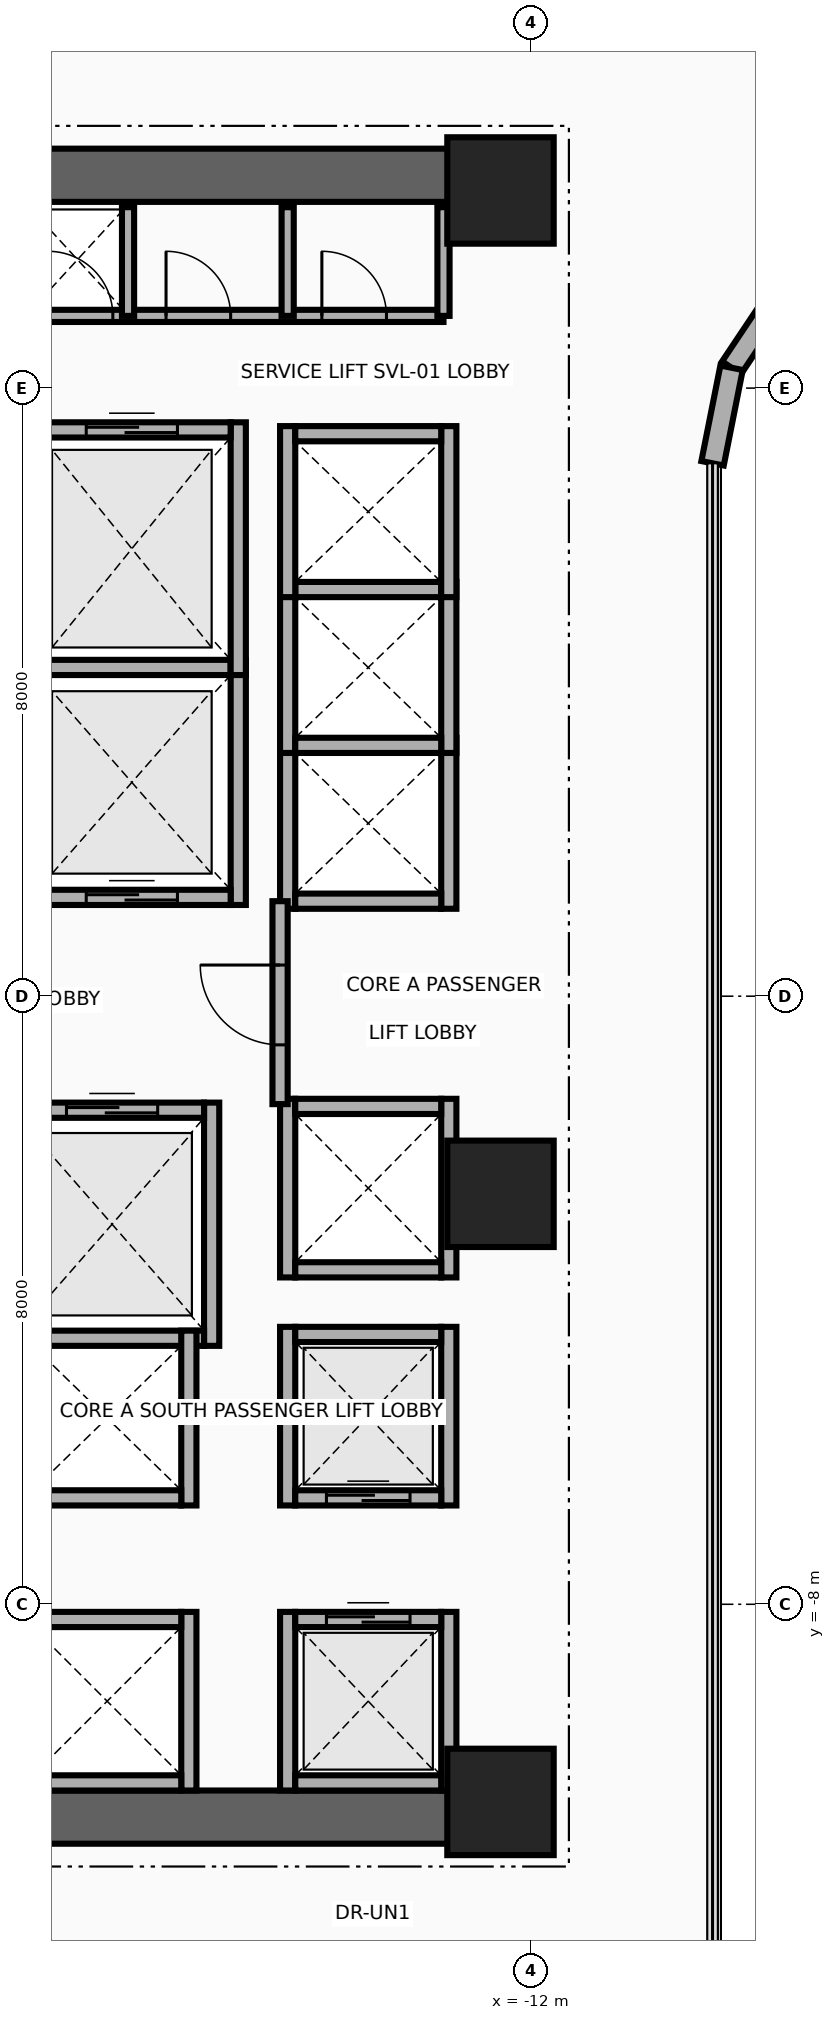
"""IFC4 building model, lengths in metres.
Left out: names, types, materials, properties, quantities, classifications, styles, units other than length and angle.
Written with IfcOpenShell. Run it as: python <this file> out.ifc"""

import sys

from ifc_helpers import new_model, si_unit, direction, frame, frame_2d, origin, origin_2d, place, context, subcontext, project, spatial, rectangle, extrude, source, transform, mapped, element, fill, save


model = new_model("IFC4")
c1 = context("Model", 3, precision=1e-05, world=origin(), true_north=direction((0.0, 1.0)))
c2 = subcontext(c1, "Body", "Model", "MODEL_VIEW")
j1 = project(units=[si_unit("LENGTHUNIT", "METRE"), si_unit("PLANEANGLEUNIT", "RADIAN")], contexts=[c1])
p1 = place(None, origin())
s1 = spatial("IfcSite", under=j1, at=p1, CompositionType="ELEMENT")
p2 = place(p1, origin())
s2 = spatial("IfcBuilding", under=s1, at=p2, CompositionType="ELEMENT")
p3 = place(p2, frame((0.0, 0.0, 40.8)))
s3 = spatial("IfcBuildingStorey", under=s2, at=p3, CompositionType="ELEMENT", Elevation=40.8)
for number, where, z_axis, x_axis in (
    (1, (-22.65, 10.8, 0.0), (0.0, 0.0, 1.0), (1.0, 0.0, 0.0)),
    (2, (-22.65, -10.8, 0.0), (0.0, 0.0, 1.0), (1.0, 0.0, 0.0)),
):
    element("IfcWall", number, at=place(p3, frame(where, z_axis=z_axis, x_axis=x_axis)), inside=s3, PredefinedType="SHEAR", context=c2, shape_type="SweptSolid", body=[
        extrude(rectangle(XDim=10.25, YDim=0.7, at=frame_2d((5.125, 0.0))), origin(), (0.0, 0.0, 1.0), 3.46),
    ])
m1 = source(origin(), c2, "Body", "SweptSolid", [
    extrude(rectangle(XDim=1.4, YDim=1.4, at=origin_2d()), origin(), (0.0, 0.0, 1.0), 3.7),
])
for number, where, z_axis, x_axis in (
    (3, (-12.4, -10.6, 0.0), (0.0, 0.0, 1.0), (1.0, 0.0, 0.0)),
    (4, (-12.4, -2.6, 0.0), (0.0, 0.0, 1.0), (1.0, 0.0, 0.0)),
    (5, (-12.4, 10.6, 0.0), (0.0, 0.0, 1.0), (1.0, 0.0, 0.0)),
):
    element("IfcColumn", number, at=place(p3, frame(where, z_axis=z_axis, x_axis=x_axis)), inside=s3, PredefinedType="COLUMN", context=c2, shape_type="MappedRepresentation", body=[
        mapped(m1, transform((0.0, 0.0, 0.0), x_axis=(1.0, 0.0, 0.0), y_axis=(0.0, 1.0, 0.0), z_axis=(0.0, 0.0, 1.0), scale=1.0)),
    ])
p4 = place(p3, frame((-8.642, 9.342, 0.0), z_axis=(0.0, 0.0, 1.0), x_axis=(-0.555615398575, -0.831439431869, 0.0)))
e6 = element("IfcWall", 6, at=p4, inside=s3, PredefinedType="SOLIDWALL", context=c2, shape_type="SweptSolid", body=[
    extrude(rectangle(XDim=1.292, YDim=0.3, at=frame_2d((0.646, 0.0))), origin(), (0.0, 0.0, 1.0), 3.46),
])
p5 = place(p3, frame((-9.36, 8.268, 0.0), z_axis=(0.0, 0.0, 1.0), x_axis=(-0.195090163074, -0.980785312019, 0.0)))
e7 = element("IfcWall", 7, at=p5, inside=s3, PredefinedType="SOLIDWALL", context=c2, shape_type="SweptSolid", body=[
    extrude(rectangle(XDim=1.281, YDim=0.3, at=frame_2d((0.641, 0.0))), origin(), (0.0, 0.0, 1.0), 3.46),
])
p6 = place(p3, frame((-15.85, 1.2, 0.0), z_axis=(0.0, 0.0, 1.0), x_axis=(0.0, 1.0, 0.0)))
e8 = element("IfcWall", 8, at=p6, inside=s3, PredefinedType="MOVABLE", context=c2, shape_type="SweptSolid", body=[
    extrude(rectangle(XDim=3.225, YDim=0.2, at=frame_2d((1.613, 0.0))), origin(), (0.0, 0.0, 1.0), 3.46),
])
p7 = place(p3, frame((-18.55, 1.3, 0.0), z_axis=(0.0, 0.0, 1.0), x_axis=(1.0, 0.0, 0.0)))
e9 = element("IfcWall", 9, at=p7, inside=s3, PredefinedType="MOVABLE", context=c2, shape_type="SweptSolid", body=[
    extrude(rectangle(XDim=2.6, YDim=0.2, at=frame_2d((1.3, 0.0))), origin(), (0.0, 0.0, 1.0), 3.46),
])
p8 = place(p7, frame((0.7, 0.0, 0.0)))
e10 = element("IfcOpeningElement", 10, at=p8, cuts=e9, PredefinedType="OPENING", context=c2, shape_type="SweptSolid", body=[
    extrude(rectangle(XDim=1.2, YDim=2.1, at=frame_2d((0.6, 1.05))), frame((0.0, 0.115, 0.0), z_axis=(0.0, -1.0, 0.0), x_axis=(1.0, 0.0, 0.0)), (0.0, 0.0, 1.0), 0.23),
])
p9 = place(p3, frame((-18.55, 4.325, 0.0), z_axis=(0.0, 0.0, 1.0), x_axis=(1.0, 0.0, 0.0)))
e11 = element("IfcWall", 11, at=p9, inside=s3, PredefinedType="MOVABLE", context=c2, shape_type="SweptSolid", body=[
    extrude(rectangle(XDim=2.6, YDim=0.2, at=frame_2d((1.3, 0.0))), origin(), (0.0, 0.0, 1.0), 3.46),
])
p10 = place(p3, frame((-16.2, -4.6, 0.0), z_axis=(0.0, 0.0, 1.0), x_axis=(0.0, 1.0, 0.0)))
e12 = element("IfcWall", 12, at=p10, inside=s3, PredefinedType="MOVABLE", context=c2, shape_type="SweptSolid", body=[
    extrude(rectangle(XDim=3.2, YDim=0.2, at=frame_2d((1.6, 0.0))), origin(), (0.0, 0.0, 1.0), 3.46),
])
p11 = place(p3, frame((-18.72, -4.5, 0.0), z_axis=(0.0, 0.0, 1.0), x_axis=(1.0, 0.0, 0.0)))
e13 = element("IfcWall", 13, at=p11, inside=s3, PredefinedType="MOVABLE", context=c2, shape_type="SweptSolid", body=[
    extrude(rectangle(XDim=2.42, YDim=0.2, at=frame_2d((1.21, 0.0))), origin(), (0.0, 0.0, 1.0), 3.46),
])
p12 = place(p3, frame((-18.72, -1.5, 0.0), z_axis=(0.0, 0.0, 1.0), x_axis=(1.0, 0.0, 0.0)))
e14 = element("IfcWall", 14, at=p12, inside=s3, PredefinedType="MOVABLE", context=c2, shape_type="SweptSolid", body=[
    extrude(rectangle(XDim=2.42, YDim=0.2, at=frame_2d((1.21, 0.0))), origin(), (0.0, 0.0, 1.0), 3.46),
])
p13 = place(p12, frame((0.61, 0.0, 0.0)))
e15 = element("IfcOpeningElement", 15, at=p13, cuts=e14, PredefinedType="OPENING", context=c2, shape_type="SweptSolid", body=[
    extrude(rectangle(XDim=1.2, YDim=2.1, at=frame_2d((0.6, 1.05))), frame((0.0, 0.115, 0.0), z_axis=(0.0, -1.0, 0.0), x_axis=(1.0, 0.0, 0.0)), (0.0, 0.0, 1.0), 0.23),
])
p14 = place(p3, frame((-15.85, 4.225, 0.0), z_axis=(0.0, 0.0, 1.0), x_axis=(0.0, 1.0, 0.0)))
e16 = element("IfcWall", 16, at=p14, inside=s3, PredefinedType="MOVABLE", context=c2, shape_type="SweptSolid", body=[
    extrude(rectangle(XDim=3.325, YDim=0.2, at=frame_2d((1.663, 0.0))), origin(), (0.0, 0.0, 1.0), 3.46),
])
p15 = place(p3, frame((-18.55, 7.45, 0.0), z_axis=(0.0, 0.0, 1.0), x_axis=(1.0, 0.0, 0.0)))
e17 = element("IfcWall", 17, at=p15, inside=s3, PredefinedType="MOVABLE", context=c2, shape_type="SweptSolid", body=[
    extrude(rectangle(XDim=2.6, YDim=0.2, at=frame_2d((1.3, 0.0))), origin(), (0.0, 0.0, 1.0), 3.46),
])
p16 = place(p15, frame((0.7, 0.0, 0.0)))
e18 = element("IfcOpeningElement", 18, at=p16, cuts=e17, PredefinedType="OPENING", context=c2, shape_type="SweptSolid", body=[
    extrude(rectangle(XDim=1.2, YDim=2.1, at=frame_2d((0.6, 1.05))), frame((0.0, 0.115, 0.0), z_axis=(0.0, -1.0, 0.0), x_axis=(1.0, 0.0, 0.0)), (0.0, 0.0, 1.0), 0.23),
])
for number, where, z_axis, x_axis in (
    (19, (-15.2, -10.45, 0.0), (0.0, 0.0, 1.0), (0.0, 1.0, 0.0)),
    (20, (-13.08, -10.45, 0.0), (0.0, 0.0, 1.0), (0.0, 1.0, 0.0)),
):
    element("IfcWall", number, at=place(p3, frame(where, z_axis=z_axis, x_axis=x_axis)), inside=s3, PredefinedType="MOVABLE", context=c2, shape_type="SweptSolid", body=[
        extrude(rectangle(XDim=2.35, YDim=0.2, at=frame_2d((1.175, 0.0))), origin(), (0.0, 0.0, 1.0), 2.583),
    ])
p17 = place(p3, frame((-15.1, -10.35, 0.0), z_axis=(0.0, 0.0, 1.0), x_axis=(1.0, 0.0, 0.0)))
e21 = element("IfcWall", 21, at=p17, inside=s3, PredefinedType="MOVABLE", context=c2, shape_type="SweptSolid", body=[
    extrude(rectangle(XDim=1.92, YDim=0.2, at=frame_2d((0.96, 0.0))), origin(), (0.0, 0.0, 1.0), 2.583),
])
p18 = place(p3, frame((-15.1, -8.2, 0.0), z_axis=(0.0, 0.0, 1.0), x_axis=(1.0, 0.0, 0.0)))
e22 = element("IfcWall", 22, at=p18, inside=s3, PredefinedType="MOVABLE", context=c2, shape_type="SweptSolid", body=[
    extrude(rectangle(XDim=1.92, YDim=0.2, at=frame_2d((0.96, 0.0))), origin(), (0.0, 0.0, 1.0), 3.46),
])
p19 = place(p18, frame((0.41, 0.0, 0.0)))
e23 = element("IfcOpeningElement", 23, at=p19, cuts=e22, PredefinedType="OPENING", context=c2, shape_type="SweptSolid", body=[
    extrude(rectangle(XDim=1.1, YDim=2.1, at=frame_2d((0.55, 1.05))), frame((0.0, 0.115, 0.0), z_axis=(0.0, -1.0, 0.0), x_axis=(1.0, 0.0, 0.0)), (0.0, 0.0, 1.0), 0.23),
])
for number, where, z_axis, x_axis in (
    (24, (-15.2, -6.7, 0.0), (0.0, 0.0, 1.0), (0.0, 1.0, 0.0)),
    (25, (-13.08, -6.7, 0.0), (0.0, 0.0, 1.0), (0.0, 1.0, 0.0)),
):
    element("IfcWall", number, at=place(p3, frame(where, z_axis=z_axis, x_axis=x_axis)), inside=s3, PredefinedType="MOVABLE", context=c2, shape_type="SweptSolid", body=[
        extrude(rectangle(XDim=2.35, YDim=0.2, at=frame_2d((1.175, 0.0))), origin(), (0.0, 0.0, 1.0), 3.46),
    ])
p20 = place(p3, frame((-15.1, -6.6, 0.0), z_axis=(0.0, 0.0, 1.0), x_axis=(1.0, 0.0, 0.0)))
e26 = element("IfcWall", 26, at=p20, inside=s3, PredefinedType="MOVABLE", context=c2, shape_type="SweptSolid", body=[
    extrude(rectangle(XDim=1.92, YDim=0.2, at=frame_2d((0.96, 0.0))), origin(), (0.0, 0.0, 1.0), 3.46),
])
p21 = place(p20, frame((0.41, 0.0, 0.0)))
e27 = element("IfcOpeningElement", 27, at=p21, cuts=e26, PredefinedType="OPENING", context=c2, shape_type="SweptSolid", body=[
    extrude(rectangle(XDim=1.1, YDim=2.1, at=frame_2d((0.55, 1.05))), frame((0.0, 0.115, 0.0), z_axis=(0.0, -1.0, 0.0), x_axis=(1.0, 0.0, 0.0)), (0.0, 0.0, 1.0), 0.23),
])
p22 = place(p3, frame((-15.1, -4.45, 0.0), z_axis=(0.0, 0.0, 1.0), x_axis=(1.0, 0.0, 0.0)))
e28 = element("IfcWall", 28, at=p22, inside=s3, PredefinedType="MOVABLE", context=c2, shape_type="SweptSolid", body=[
    extrude(rectangle(XDim=1.92, YDim=0.2, at=frame_2d((0.96, 0.0))), origin(), (0.0, 0.0, 1.0), 3.46),
])
p23 = place(p3, frame((-16.5, -10.45, 0.0), z_axis=(0.0, 0.0, 1.0), x_axis=(0.0, 1.0, 0.0)))
e29 = element("IfcWall", 29, at=p23, inside=s3, PredefinedType="MOVABLE", context=c2, shape_type="SweptSolid", body=[
    extrude(rectangle(XDim=2.35, YDim=0.2, at=frame_2d((1.175, 0.0))), origin(), (0.0, 0.0, 1.0), 2.583),
])
p24 = place(p3, frame((-18.55, -10.35, 0.0), z_axis=(0.0, 0.0, 1.0), x_axis=(1.0, 0.0, 0.0)))
e30 = element("IfcWall", 30, at=p24, inside=s3, PredefinedType="MOVABLE", context=c2, shape_type="SweptSolid", body=[
    extrude(rectangle(XDim=1.95, YDim=0.2, at=frame_2d((0.975, 0.0))), origin(), (0.0, 0.0, 1.0), 2.583),
])
p25 = place(p3, frame((-18.55, -8.2, 0.0), z_axis=(0.0, 0.0, 1.0), x_axis=(1.0, 0.0, 0.0)))
e31 = element("IfcWall", 31, at=p25, inside=s3, PredefinedType="MOVABLE", context=c2, shape_type="SweptSolid", body=[
    extrude(rectangle(XDim=1.95, YDim=0.2, at=frame_2d((0.975, 0.0))), origin(), (0.0, 0.0, 1.0), 3.46),
])
for number, where, z_axis, x_axis in (
    (32, (-15.2, 1.15, 0.0), (0.0, 0.0, 1.0), (0.0, 1.0, 0.0)),
    (33, (-13.08, 1.15, 0.0), (0.0, 0.0, 1.0), (0.0, 1.0, 0.0)),
):
    element("IfcWall", number, at=place(p3, frame(where, z_axis=z_axis, x_axis=x_axis)), inside=s3, PredefinedType="MOVABLE", context=c2, shape_type="SweptSolid", body=[
        extrude(rectangle(XDim=2.25, YDim=0.2, at=frame_2d((1.125, 0.0))), origin(), (0.0, 0.0, 1.0), 3.46),
    ])
p26 = place(p3, frame((-15.1, 1.25, 0.0), z_axis=(0.0, 0.0, 1.0), x_axis=(1.0, 0.0, 0.0)))
e34 = element("IfcWall", 34, at=p26, inside=s3, PredefinedType="MOVABLE", context=c2, shape_type="SweptSolid", body=[
    extrude(rectangle(XDim=1.92, YDim=0.2, at=frame_2d((0.96, 0.0))), origin(), (0.0, 0.0, 1.0), 3.46),
])
for number, where, z_axis, x_axis in (
    (35, (-15.2, 3.2, 0.0), (0.0, 0.0, 1.0), (0.0, 1.0, 0.0)),
    (36, (-13.08, 3.2, 0.0), (0.0, 0.0, 1.0), (0.0, 1.0, 0.0)),
):
    element("IfcWall", number, at=place(p3, frame(where, z_axis=z_axis, x_axis=x_axis)), inside=s3, PredefinedType="MOVABLE", context=c2, shape_type="SweptSolid", body=[
        extrude(rectangle(XDim=2.25, YDim=0.2, at=frame_2d((1.125, 0.0))), origin(), (0.0, 0.0, 1.0), 3.46),
    ])
for number, where, z_axis, x_axis in (
    (37, (-15.1, 3.3, 0.0), (0.0, 0.0, 1.0), (1.0, 0.0, 0.0)),
    (38, (-15.1, 5.35, 0.0), (0.0, 0.0, 1.0), (1.0, 0.0, 0.0)),
):
    element("IfcWall", number, at=place(p3, frame(where, z_axis=z_axis, x_axis=x_axis)), inside=s3, PredefinedType="MOVABLE", context=c2, shape_type="SweptSolid", body=[
        extrude(rectangle(XDim=1.92, YDim=0.2, at=frame_2d((0.96, 0.0))), origin(), (0.0, 0.0, 1.0), 3.46),
    ])
for number, where, z_axis, x_axis in (
    (39, (-15.2, 5.25, 0.0), (0.0, 0.0, 1.0), (0.0, 1.0, 0.0)),
    (40, (-13.08, 5.25, 0.0), (0.0, 0.0, 1.0), (0.0, 1.0, 0.0)),
):
    element("IfcWall", number, at=place(p3, frame(where, z_axis=z_axis, x_axis=x_axis)), inside=s3, PredefinedType="MOVABLE", context=c2, shape_type="SweptSolid", body=[
        extrude(rectangle(XDim=2.25, YDim=0.2, at=frame_2d((1.125, 0.0))), origin(), (0.0, 0.0, 1.0), 3.46),
    ])
p27 = place(p3, frame((-15.1, 7.4, 0.0), z_axis=(0.0, 0.0, 1.0), x_axis=(1.0, 0.0, 0.0)))
e41 = element("IfcWall", 41, at=p27, inside=s3, PredefinedType="MOVABLE", context=c2, shape_type="SweptSolid", body=[
    extrude(rectangle(XDim=1.92, YDim=0.2, at=frame_2d((0.96, 0.0))), origin(), (0.0, 0.0, 1.0), 3.46),
])
p28 = place(p3, frame((-16.5, -6.7, 0.0), z_axis=(0.0, 0.0, 1.0), x_axis=(0.0, 1.0, 0.0)))
e42 = element("IfcWall", 42, at=p28, inside=s3, PredefinedType="MOVABLE", context=c2, shape_type="SweptSolid", body=[
    extrude(rectangle(XDim=2.3, YDim=0.2, at=frame_2d((1.15, 0.0))), origin(), (0.0, 0.0, 1.0), 3.46),
])
p29 = place(p3, frame((-18.55, -6.6, 0.0), z_axis=(0.0, 0.0, 1.0), x_axis=(1.0, 0.0, 0.0)))
e43 = element("IfcWall", 43, at=p29, inside=s3, PredefinedType="MOVABLE", context=c2, shape_type="SweptSolid", body=[
    extrude(rectangle(XDim=1.95, YDim=0.2, at=frame_2d((0.975, 0.0))), origin(), (0.0, 0.0, 1.0), 3.46),
])
for number, where, z_axis, x_axis in (
    (44, (-15.2, -3.7, 0.0), (0.0, 0.0, 1.0), (0.0, 1.0, 0.0)),
    (45, (-13.08, -3.7, 0.0), (0.0, 0.0, 1.0), (0.0, 1.0, 0.0)),
):
    element("IfcWall", number, at=place(p3, frame(where, z_axis=z_axis, x_axis=x_axis)), inside=s3, PredefinedType="MOVABLE", context=c2, shape_type="SweptSolid", body=[
        extrude(rectangle(XDim=2.35, YDim=0.2, at=frame_2d((1.175, 0.0))), origin(), (0.0, 0.0, 1.0), 3.46),
    ])
for number, where, z_axis, x_axis in (
    (46, (-15.1, -3.6, 0.0), (0.0, 0.0, 1.0), (1.0, 0.0, 0.0)),
    (47, (-15.1, -1.45, 0.0), (0.0, 0.0, 1.0), (1.0, 0.0, 0.0)),
):
    element("IfcWall", number, at=place(p3, frame(where, z_axis=z_axis, x_axis=x_axis)), inside=s3, PredefinedType="MOVABLE", context=c2, shape_type="SweptSolid", body=[
        extrude(rectangle(XDim=1.92, YDim=0.2, at=frame_2d((0.96, 0.0))), origin(), (0.0, 0.0, 1.0), 3.46),
    ])
p30 = place(p3, frame((-15.3, -1.42, 0.0), z_axis=(0.0, 0.0, 1.0), x_axis=(0.0, 1.0, 0.0)))
e48 = element("IfcWall", 48, at=p30, inside=s3, PredefinedType="PARTITIONING", context=c2, shape_type="SweptSolid", body=[
    extrude(rectangle(XDim=2.67, YDim=0.2, at=frame_2d((1.335, 0.0))), origin(), (0.0, 0.0, 1.0), 3.46),
])
p31 = place(p30, frame((0.78, 0.0, 0.0)))
e49 = element("IfcOpeningElement", 49, at=p31, cuts=e48, PredefinedType="OPENING", context=c2, shape_type="SweptSolid", body=[
    extrude(rectangle(XDim=1.05, YDim=2.15, at=frame_2d((0.525, 1.075))), frame((0.0, 0.115, 0.0), z_axis=(0.0, -1.0, 0.0), x_axis=(1.0, 0.0, 0.0)), (0.0, 0.0, 1.0), 0.23),
])
p32 = place(p3, frame((-18.65, 8.95, 0.0), z_axis=(0.0, 0.0, 1.0), x_axis=(1.0, 0.0, 0.0)))
e50 = element("IfcWall", 50, at=p32, inside=s3, PredefinedType="PARTITIONING", context=c2, shape_type="SweptSolid", body=[
    extrude(rectangle(XDim=5.5, YDim=0.16, at=frame_2d((2.75, 0.0))), origin(), (0.0, 0.0, 1.0), 3.46),
])
p33 = place(p32, frame((0.3, 0.0, 0.0)))
e51 = element("IfcOpeningElement", 51, at=p33, cuts=e50, PredefinedType="OPENING", context=c2, shape_type="SweptSolid", body=[
    extrude(rectangle(XDim=0.85, YDim=2.05, at=frame_2d((0.425, 1.025))), frame((0.0, 0.095, 0.0), z_axis=(0.0, -1.0, 0.0), x_axis=(1.0, 0.0, 0.0)), (0.0, 0.0, 1.0), 0.19),
])
p34 = place(p32, frame((1.85, 0.0, 0.0)))
e52 = element("IfcOpeningElement", 52, at=p34, cuts=e50, PredefinedType="OPENING", context=c2, shape_type="SweptSolid", body=[
    extrude(rectangle(XDim=0.85, YDim=2.05, at=frame_2d((0.425, 1.025))), frame((0.0, 0.095, 0.0), z_axis=(0.0, -1.0, 0.0), x_axis=(1.0, 0.0, 0.0)), (0.0, 0.0, 1.0), 0.19),
])
p35 = place(p32, frame((3.9, 0.0, 0.0)))
e53 = element("IfcOpeningElement", 53, at=p35, cuts=e50, PredefinedType="OPENING", context=c2, shape_type="SweptSolid", body=[
    extrude(rectangle(XDim=0.85, YDim=2.05, at=frame_2d((0.425, 1.025))), frame((0.0, 0.095, 0.0), z_axis=(0.0, -1.0, 0.0), x_axis=(1.0, 0.0, 0.0)), (0.0, 0.0, 1.0), 0.19),
])
for number, where, z_axis, x_axis in (
    (54, (-13.15, 8.95, 0.0), (0.0, 0.0, 1.0), (0.0, 1.0, 0.0)),
    (55, (-17.3, 8.95, 0.0), (0.0, 0.0, 1.0), (0.0, 1.0, 0.0)),
    (56, (-15.2, 8.95, 0.0), (0.0, 0.0, 1.0), (0.0, 1.0, 0.0)),
):
    element("IfcWall", number, at=place(p3, frame(where, z_axis=z_axis, x_axis=x_axis)), inside=s3, PredefinedType="PARTITIONING", context=c2, shape_type="SweptSolid", body=[
        extrude(rectangle(XDim=1.43, YDim=0.16, at=frame_2d((0.715, 0.0))), origin(), (0.0, 0.0, 1.0), 3.46),
    ])
p36 = place(p8, origin())
e57 = element("IfcDoor", 57, at=p36, inside=s3, OperationType="DOUBLE_DOOR_SLIDING", PredefinedType="DOOR", context=c2, shape_type="SweptSolid", body=[
    extrude(rectangle(XDim=1.2, YDim=2.1, at=frame_2d((0.6, 1.05))), frame((0.0, 0.025, 0.0), z_axis=(0.0, -1.0, 0.0), x_axis=(1.0, 0.0, 0.0)), (0.0, 0.0, 1.0), 0.05),
])
fill(e10, e57)
p37 = place(p13, origin())
e58 = element("IfcDoor", 58, at=p37, inside=s3, OperationType="DOUBLE_DOOR_SLIDING", PredefinedType="DOOR", context=c2, shape_type="SweptSolid", body=[
    extrude(rectangle(XDim=1.2, YDim=2.1, at=frame_2d((0.6, 1.05))), frame((0.0, 0.025, 0.0), z_axis=(0.0, -1.0, 0.0), x_axis=(1.0, 0.0, 0.0)), (0.0, 0.0, 1.0), 0.05),
])
fill(e15, e58)
p38 = place(p16, origin())
e59 = element("IfcDoor", 59, at=p38, inside=s3, OperationType="DOUBLE_DOOR_SLIDING", PredefinedType="DOOR", context=c2, shape_type="SweptSolid", body=[
    extrude(rectangle(XDim=1.2, YDim=2.1, at=frame_2d((0.6, 1.05))), frame((0.0, 0.025, 0.0), z_axis=(0.0, -1.0, 0.0), x_axis=(1.0, 0.0, 0.0)), (0.0, 0.0, 1.0), 0.05),
])
fill(e18, e59)
p39 = place(p19, origin())
e60 = element("IfcDoor", 60, at=p39, inside=s3, OperationType="DOUBLE_DOOR_SLIDING", PredefinedType="DOOR", context=c2, shape_type="SweptSolid", body=[
    extrude(rectangle(XDim=1.1, YDim=2.1, at=frame_2d((0.55, 1.05))), frame((0.0, 0.025, 0.0), z_axis=(0.0, -1.0, 0.0), x_axis=(1.0, 0.0, 0.0)), (0.0, 0.0, 1.0), 0.05),
])
fill(e23, e60)
p40 = place(p21, origin())
e61 = element("IfcDoor", 61, at=p40, inside=s3, OperationType="DOUBLE_DOOR_SLIDING", PredefinedType="DOOR", context=c2, shape_type="SweptSolid", body=[
    extrude(rectangle(XDim=1.1, YDim=2.1, at=frame_2d((0.55, 1.05))), frame((0.0, 0.025, 0.0), z_axis=(0.0, -1.0, 0.0), x_axis=(1.0, 0.0, 0.0)), (0.0, 0.0, 1.0), 0.05),
])
fill(e27, e61)
p41 = place(p31, origin())
e62 = element("IfcDoor", 62, at=p41, inside=s3, OperationType="SINGLE_SWING_RIGHT", PredefinedType="DOOR", context=c2, shape_type="SweptSolid", body=[
    extrude(rectangle(XDim=1.05, YDim=2.15, at=frame_2d((0.525, 1.075))), frame((0.0, 0.025, 0.0), z_axis=(0.0, -1.0, 0.0), x_axis=(1.0, 0.0, 0.0)), (0.0, 0.0, 1.0), 0.05),
])
fill(e49, e62)
p42 = place(p33, origin())
e63 = element("IfcDoor", 63, at=p42, inside=s3, OperationType="SINGLE_SWING_LEFT", PredefinedType="DOOR", context=c2, shape_type="SweptSolid", body=[
    extrude(rectangle(XDim=0.85, YDim=2.05, at=frame_2d((0.425, 1.025))), frame((0.0, 0.025, 0.0), z_axis=(0.0, -1.0, 0.0), x_axis=(1.0, 0.0, 0.0)), (0.0, 0.0, 1.0), 0.05),
])
fill(e51, e63)
p43 = place(p34, origin())
e64 = element("IfcDoor", 64, at=p43, inside=s3, OperationType="SINGLE_SWING_RIGHT", PredefinedType="DOOR", context=c2, shape_type="SweptSolid", body=[
    extrude(rectangle(XDim=0.85, YDim=2.05, at=frame_2d((0.425, 1.025))), frame((0.0, 0.025, 0.0), z_axis=(0.0, -1.0, 0.0), x_axis=(1.0, 0.0, 0.0)), (0.0, 0.0, 1.0), 0.05),
])
fill(e52, e64)
p44 = place(p35, origin())
e65 = element("IfcDoor", 65, at=p44, inside=s3, OperationType="SINGLE_SWING_LEFT", PredefinedType="DOOR", context=c2, shape_type="SweptSolid", body=[
    extrude(rectangle(XDim=0.85, YDim=2.05, at=frame_2d((0.425, 1.025))), frame((0.0, 0.025, 0.0), z_axis=(0.0, -1.0, 0.0), x_axis=(1.0, 0.0, 0.0)), (0.0, 0.0, 1.0), 0.05),
])
fill(e53, e65)
save(model, sys.argv[1])
